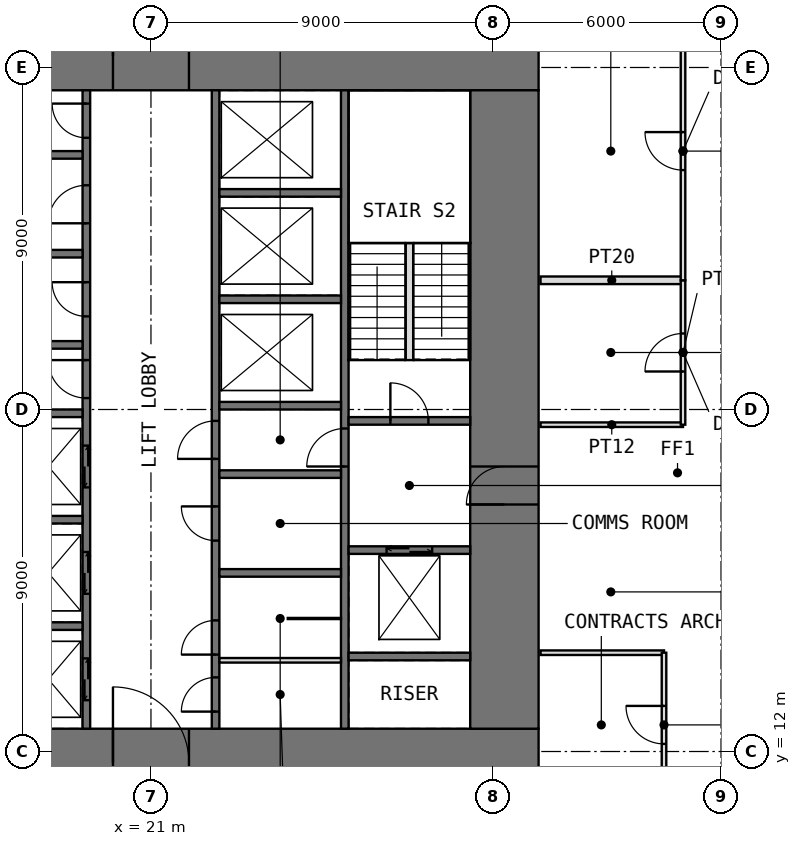
"""IFC4 building model, lengths in metres.
Left out: names, types, materials, properties, quantities, classifications, styles, units other than length and angle.
Written with IfcOpenShell. Run it as: python <this file> out.ifc"""

import sys

from ifc_helpers import new_model, si_unit, direction, frame, frame_2d, origin, place, context, subcontext, project, spatial, rectangle, extrude, element, fill, save


model = new_model("IFC4")
c1 = context("Model", 3, precision=1e-05, world=origin(), true_north=direction((0.0, 1.0)))
c2 = subcontext(c1, "Body", "Model", "MODEL_VIEW")
j1 = project(units=[si_unit("LENGTHUNIT", "METRE"), si_unit("PLANEANGLEUNIT", "RADIAN")], contexts=[c1])
p1 = place(None, origin())
s1 = spatial("IfcSite", under=j1, at=p1, CompositionType="ELEMENT")
p2 = place(p1, origin())
s2 = spatial("IfcBuilding", under=s1, at=p2, CompositionType="ELEMENT")
p3 = place(p2, frame((0.0, 0.0, 74.5)))
s3 = spatial("IfcBuildingStorey", under=s2, at=p3, CompositionType="ELEMENT", Elevation=74.5)
p4 = place(p3, frame((10.8, 11.7, -0.05), z_axis=(0.0, 0.0, 1.0), x_axis=(1.0, 0.0, 0.0)))
e1 = element("IfcWall", 1, at=p4, inside=s3, PredefinedType="SHEAR", context=c2, shape_type="SweptSolid", body=[
    extrude(rectangle(XDim=20.4, YDim=1.8, at=frame_2d((10.2, 0.0))), origin(), (0.0, 0.0, 1.0), 4.0),
])
p5 = place(p4, frame((9.2, 0.0, 0.05)))
e2 = element("IfcOpeningElement", 2, at=p5, cuts=e1, PredefinedType="OPENING", context=c2, shape_type="SweptSolid", body=[
    extrude(rectangle(XDim=2.0, YDim=2.2, at=frame_2d((1.0, 1.1))), frame((0.0, 0.91, 0.0), z_axis=(0.0, -1.0, 0.0), x_axis=(1.0, 0.0, 0.0)), (0.0, 0.0, 1.0), 1.82),
])
p6 = place(p3, frame((10.8, 30.3, -0.05), z_axis=(0.0, 0.0, 1.0), x_axis=(1.0, 0.0, 0.0)))
e3 = element("IfcWall", 3, at=p6, inside=s3, PredefinedType="SHEAR", context=c2, shape_type="SweptSolid", body=[
    extrude(rectangle(XDim=20.4, YDim=1.8, at=frame_2d((10.2, 0.0))), origin(), (0.0, 0.0, 1.0), 4.0),
])
p7 = place(p6, frame((9.2, 0.0, 0.05)))
e4 = element("IfcOpeningElement", 4, at=p7, cuts=e3, PredefinedType="OPENING", context=c2, shape_type="SweptSolid", body=[
    extrude(rectangle(XDim=2.0, YDim=2.2, at=frame_2d((1.0, 1.1))), frame((0.0, 0.91, 0.0), z_axis=(0.0, -1.0, 0.0), x_axis=(1.0, 0.0, 0.0)), (0.0, 0.0, 1.0), 1.82),
])
p8 = place(p3, frame((30.3, 12.6, -0.05), z_axis=(0.0, 0.0, 1.0), x_axis=(0.0, 1.0, 0.0)))
e5 = element("IfcWall", 5, at=p8, inside=s3, PredefinedType="SHEAR", context=c2, shape_type="SweptSolid", body=[
    extrude(rectangle(XDim=16.8, YDim=1.8, at=frame_2d((8.4, 0.0))), origin(), (0.0, 0.0, 1.0), 4.0),
])
p9 = place(p8, frame((5.9, 0.0, 0.05)))
e6 = element("IfcOpeningElement", 6, at=p9, cuts=e5, PredefinedType="OPENING", context=c2, shape_type="SweptSolid", body=[
    extrude(rectangle(XDim=1.0, YDim=2.2, at=frame_2d((0.5, 1.1))), frame((0.0, 0.91, 0.0), z_axis=(0.0, -1.0, 0.0), x_axis=(1.0, 0.0, 0.0)), (0.0, 0.0, 1.0), 1.82),
])
p10 = place(p3, frame((19.3, 12.6, -0.05), z_axis=(0.0, 0.0, 1.0), x_axis=(0.0, 1.0, 0.0)))
e7 = element("IfcWall", 7, at=p10, inside=s3, PredefinedType="SHEAR", context=c2, shape_type="SweptSolid", body=[
    extrude(rectangle(XDim=16.8, YDim=0.2, at=frame_2d((8.4, 0.0))), origin(), (0.0, 0.0, 1.0), 4.0),
])
p11 = place(p10, frame((8.7, 0.0, 0.05)))
e8 = element("IfcOpeningElement", 8, at=p11, cuts=e7, PredefinedType="OPENING", context=c2, shape_type="SweptSolid", body=[
    extrude(rectangle(XDim=1.0, YDim=2.2, at=frame_2d((0.5, 1.1))), frame((0.0, 0.11, 0.0), z_axis=(0.0, -1.0, 0.0), x_axis=(1.0, 0.0, 0.0)), (0.0, 0.0, 1.0), 0.22),
])
p12 = place(p10, frame((10.85, 0.0, 0.05)))
e9 = element("IfcOpeningElement", 9, at=p12, cuts=e7, PredefinedType="OPENING", context=c2, shape_type="SweptSolid", body=[
    extrude(rectangle(XDim=0.9, YDim=2.2, at=frame_2d((0.45, 1.1))), frame((0.0, 0.11, 0.0), z_axis=(0.0, -1.0, 0.0), x_axis=(1.0, 0.0, 0.0)), (0.0, 0.0, 1.0), 0.22),
])
p13 = place(p10, frame((13.3, 0.0, 0.05)))
e10 = element("IfcOpeningElement", 10, at=p13, cuts=e7, PredefinedType="OPENING", context=c2, shape_type="SweptSolid", body=[
    extrude(rectangle(XDim=1.0, YDim=2.2, at=frame_2d((0.5, 1.1))), frame((0.0, 0.11, 0.0), z_axis=(0.0, -1.0, 0.0), x_axis=(1.0, 0.0, 0.0)), (0.0, 0.0, 1.0), 0.22),
])
p14 = place(p10, frame((15.55, 0.0, 0.05)))
e11 = element("IfcOpeningElement", 11, at=p14, cuts=e7, PredefinedType="OPENING", context=c2, shape_type="SweptSolid", body=[
    extrude(rectangle(XDim=0.9, YDim=2.2, at=frame_2d((0.45, 1.1))), frame((0.0, 0.11, 0.0), z_axis=(0.0, -1.0, 0.0), x_axis=(1.0, 0.0, 0.0)), (0.0, 0.0, 1.0), 0.22),
])
p15 = place(p10, frame((0.75, 0.0, 0.05)))
e12 = element("IfcOpeningElement", 12, at=p15, cuts=e7, PredefinedType="OPENING", context=c2, shape_type="SweptSolid", body=[
    extrude(rectangle(XDim=1.1, YDim=2.2, at=frame_2d((0.55, 1.1))), frame((0.0, 0.11, 0.0), z_axis=(0.0, -1.0, 0.0), x_axis=(1.0, 0.0, 0.0)), (0.0, 0.0, 1.0), 0.22),
])
p16 = place(p10, frame((3.55, 0.0, 0.05)))
e13 = element("IfcOpeningElement", 13, at=p16, cuts=e7, PredefinedType="OPENING", context=c2, shape_type="SweptSolid", body=[
    extrude(rectangle(XDim=1.1, YDim=2.2, at=frame_2d((0.55, 1.1))), frame((0.0, 0.11, 0.0), z_axis=(0.0, -1.0, 0.0), x_axis=(1.0, 0.0, 0.0)), (0.0, 0.0, 1.0), 0.22),
])
p17 = place(p10, frame((6.35, 0.0, 0.05)))
e14 = element("IfcOpeningElement", 14, at=p17, cuts=e7, PredefinedType="OPENING", context=c2, shape_type="SweptSolid", body=[
    extrude(rectangle(XDim=1.1, YDim=2.2, at=frame_2d((0.55, 1.1))), frame((0.0, 0.11, 0.0), z_axis=(0.0, -1.0, 0.0), x_axis=(1.0, 0.0, 0.0)), (0.0, 0.0, 1.0), 0.22),
])
p18 = place(p3, frame((22.7, 12.6, -0.05), z_axis=(0.0, 0.0, 1.0), x_axis=(0.0, 1.0, 0.0)))
e15 = element("IfcWall", 15, at=p18, inside=s3, PredefinedType="SHEAR", context=c2, shape_type="SweptSolid", body=[
    extrude(rectangle(XDim=16.8, YDim=0.2, at=frame_2d((8.4, 0.0))), origin(), (0.0, 0.0, 1.0), 4.0),
])
p19 = place(p18, frame((0.45, 0.0, 0.05)))
e16 = element("IfcOpeningElement", 16, at=p19, cuts=e15, PredefinedType="OPENING", context=c2, shape_type="SweptSolid", body=[
    extrude(rectangle(XDim=0.9, YDim=2.2, at=frame_2d((0.45, 1.1))), frame((0.0, 0.11, 0.0), z_axis=(0.0, -1.0, 0.0), x_axis=(1.0, 0.0, 0.0)), (0.0, 0.0, 1.0), 0.22),
])
p20 = place(p18, frame((7.1, 0.0, 0.05)))
e17 = element("IfcOpeningElement", 17, at=p20, cuts=e15, PredefinedType="OPENING", context=c2, shape_type="SweptSolid", body=[
    extrude(rectangle(XDim=1.0, YDim=2.2, at=frame_2d((0.5, 1.1))), frame((0.0, 0.11, 0.0), z_axis=(0.0, -1.0, 0.0), x_axis=(1.0, 0.0, 0.0)), (0.0, 0.0, 1.0), 0.22),
])
p21 = place(p18, frame((1.95, 0.0, 0.05)))
e18 = element("IfcOpeningElement", 18, at=p21, cuts=e15, PredefinedType="OPENING", context=c2, shape_type="SweptSolid", body=[
    extrude(rectangle(XDim=0.9, YDim=2.2, at=frame_2d((0.45, 1.1))), frame((0.0, 0.11, 0.0), z_axis=(0.0, -1.0, 0.0), x_axis=(1.0, 0.0, 0.0)), (0.0, 0.0, 1.0), 0.22),
])
p22 = place(p18, frame((4.95, 0.0, 0.05)))
e19 = element("IfcOpeningElement", 19, at=p22, cuts=e15, PredefinedType="OPENING", context=c2, shape_type="SweptSolid", body=[
    extrude(rectangle(XDim=0.9, YDim=2.2, at=frame_2d((0.45, 1.1))), frame((0.0, 0.11, 0.0), z_axis=(0.0, -1.0, 0.0), x_axis=(1.0, 0.0, 0.0)), (0.0, 0.0, 1.0), 0.22),
])
p23 = place(p3, frame((26.1, 12.6, -0.05), z_axis=(0.0, 0.0, 1.0), x_axis=(0.0, 1.0, 0.0)))
e20 = element("IfcWall", 20, at=p23, inside=s3, PredefinedType="SHEAR", context=c2, shape_type="SweptSolid", body=[
    extrude(rectangle(XDim=16.8, YDim=0.2, at=frame_2d((8.4, 0.0))), origin(), (0.0, 0.0, 1.0), 4.0),
])
p24 = place(p23, frame((6.9, 0.0, 0.05)))
e21 = element("IfcOpeningElement", 21, at=p24, cuts=e20, PredefinedType="OPENING", context=c2, shape_type="SweptSolid", body=[
    extrude(rectangle(XDim=1.0, YDim=2.2, at=frame_2d((0.5, 1.1))), frame((0.0, 0.11, 0.0), z_axis=(0.0, -1.0, 0.0), x_axis=(1.0, 0.0, 0.0)), (0.0, 0.0, 1.0), 0.22),
])
for number, where, z_axis, x_axis in (
    (22, (16.0, 15.3, -0.05), (0.0, 0.0, 1.0), (1.0, 0.0, 0.0)),
    (23, (16.0, 18.1, -0.05), (0.0, 0.0, 1.0), (1.0, 0.0, 0.0)),
    (24, (16.0, 20.9, -0.05), (0.0, 0.0, 1.0), (1.0, 0.0, 0.0)),
    (25, (16.0, 22.7, -0.05), (0.0, 0.0, 1.0), (1.0, 0.0, 0.0)),
    (26, (16.0, 25.1, -0.05), (0.0, 0.0, 1.0), (1.0, 0.0, 0.0)),
    (27, (16.0, 27.7, -0.05), (0.0, 0.0, 1.0), (1.0, 0.0, 0.0)),
    (28, (22.8, 16.7, -0.05), (0.0, 0.0, 1.0), (1.0, 0.0, 0.0)),
    (29, (22.8, 19.3, -0.05), (0.0, 0.0, 1.0), (1.0, 0.0, 0.0)),
    (30, (22.8, 21.1, -0.05), (0.0, 0.0, 1.0), (1.0, 0.0, 0.0)),
    (31, (22.8, 23.9, -0.05), (0.0, 0.0, 1.0), (1.0, 0.0, 0.0)),
    (32, (22.8, 26.7, -0.05), (0.0, 0.0, 1.0), (1.0, 0.0, 0.0)),
    (33, (26.2, 14.5, -0.05), (0.0, 0.0, 1.0), (1.0, 0.0, 0.0)),
):
    element("IfcWall", number, at=place(p3, frame(where, z_axis=z_axis, x_axis=x_axis)), inside=s3, PredefinedType="SHEAR", context=c2, shape_type="SweptSolid", body=[
        extrude(rectangle(XDim=3.2, YDim=0.2, at=frame_2d((1.6, 0.0))), origin(), (0.0, 0.0, 1.0), 4.0),
    ])
p25 = place(p3, frame((26.2, 17.3, -0.05), z_axis=(0.0, 0.0, 1.0), x_axis=(1.0, 0.0, 0.0)))
e34 = element("IfcWall", 34, at=p25, inside=s3, PredefinedType="SHEAR", context=c2, shape_type="SweptSolid", body=[
    extrude(rectangle(XDim=3.2, YDim=0.2, at=frame_2d((1.6, 0.0))), origin(), (0.0, 0.0, 1.0), 4.0),
])
p26 = place(p25, frame((1.0, 0.0, 0.05)))
e35 = element("IfcOpeningElement", 35, at=p26, cuts=e34, PredefinedType="OPENING", context=c2, shape_type="SweptSolid", body=[
    extrude(rectangle(XDim=1.2, YDim=2.2, at=frame_2d((0.6, 1.1))), frame((0.0, 0.11, 0.0), z_axis=(0.0, -1.0, 0.0), x_axis=(1.0, 0.0, 0.0)), (0.0, 0.0, 1.0), 0.22),
])
p27 = place(p3, frame((26.2, 20.7, -0.05), z_axis=(0.0, 0.0, 1.0), x_axis=(1.0, 0.0, 0.0)))
e36 = element("IfcWall", 36, at=p27, inside=s3, PredefinedType="SHEAR", context=c2, shape_type="SweptSolid", body=[
    extrude(rectangle(XDim=3.2, YDim=0.2, at=frame_2d((1.6, 0.0))), origin(), (0.0, 0.0, 1.0), 4.0),
])
p28 = place(p27, frame((1.1, 0.0, 0.05)))
e37 = element("IfcOpeningElement", 37, at=p28, cuts=e36, PredefinedType="OPENING", context=c2, shape_type="SweptSolid", body=[
    extrude(rectangle(XDim=1.0, YDim=2.2, at=frame_2d((0.5, 1.1))), frame((0.0, 0.11, 0.0), z_axis=(0.0, -1.0, 0.0), x_axis=(1.0, 0.0, 0.0)), (0.0, 0.0, 1.0), 0.22),
])
p29 = place(p3, frame((22.8, 14.4, 0.0), z_axis=(0.0, 0.0, 1.0), x_axis=(1.0, 0.0, 0.0)))
e38 = element("IfcWall", 38, at=p29, inside=s3, PredefinedType="PARTITIONING", context=c2, shape_type="SweptSolid", body=[
    extrude(rectangle(XDim=3.2, YDim=0.12, at=frame_2d((1.6, 0.0))), origin(), (0.0, 0.0, 1.0), 3.75),
])
p30 = place(p3, frame((24.6, 15.5, 0.0), z_axis=(0.0, 0.0, 1.0), x_axis=(1.0, 0.0, 0.0)))
e39 = element("IfcWall", 39, at=p30, inside=s3, PredefinedType="PARTITIONING", context=c2, shape_type="SweptSolid", body=[
    extrude(rectangle(XDim=1.4, YDim=0.03, at=frame_2d((0.7, 0.0))), origin(), (0.0, 0.0, 1.0), 3.75),
])
p31 = place(p3, frame((31.25, 14.6, 0.0), z_axis=(0.0, 0.0, 1.0), x_axis=(1.0, 0.0, 0.0)))
e40 = element("IfcWall", 40, at=p31, inside=s3, PredefinedType="PARTITIONING", context=c2, shape_type="SweptSolid", body=[
    extrude(rectangle(XDim=3.25, YDim=0.12, at=frame_2d((1.625, 0.0))), origin(), (0.0, 0.0, 1.0), 3.75),
])
p32 = place(p3, frame((31.25, 20.6, 0.0), z_axis=(0.0, 0.0, 1.0), x_axis=(1.0, 0.0, 0.0)))
e41 = element("IfcWall", 41, at=p32, inside=s3, PredefinedType="PARTITIONING", context=c2, shape_type="SweptSolid", body=[
    extrude(rectangle(XDim=3.75, YDim=0.12, at=frame_2d((1.875, 0.0))), origin(), (0.0, 0.0, 1.0), 3.75),
])
p33 = place(p3, frame((31.25, 24.4, 0.0), z_axis=(0.0, 0.0, 1.0), x_axis=(1.0, 0.0, 0.0)))
e42 = element("IfcWall", 42, at=p33, inside=s3, PredefinedType="PARTITIONING", context=c2, shape_type="SweptSolid", body=[
    extrude(rectangle(XDim=3.75, YDim=0.2, at=frame_2d((1.875, 0.0))), origin(), (0.0, 0.0, 1.0), 3.75),
])
p34 = place(p3, frame((34.5, 10.8, 0.0), z_axis=(0.0, 0.0, 1.0), x_axis=(0.0, 1.0, 0.0)))
e43 = element("IfcWall", 43, at=p34, inside=s3, PredefinedType="PARTITIONING", context=c2, shape_type="SweptSolid", body=[
    extrude(rectangle(XDim=3.8, YDim=0.12, at=frame_2d((1.9, 0.0))), origin(), (0.0, 0.0, 1.0), 3.75),
])
p35 = place(p34, frame((1.4, 0.0, 0.0)))
e44 = element("IfcOpeningElement", 44, at=p35, cuts=e43, PredefinedType="OPENING", context=c2, shape_type="SweptSolid", body=[
    extrude(rectangle(XDim=1.0, YDim=2.2, at=frame_2d((0.5, 1.1))), frame((0.0, 0.07, 0.0), z_axis=(0.0, -1.0, 0.0), x_axis=(1.0, 0.0, 0.0)), (0.0, 0.0, 1.0), 0.14),
])
p36 = place(p3, frame((35.0, 20.6, 0.0), z_axis=(0.0, 0.0, 1.0), x_axis=(0.0, 1.0, 0.0)))
e45 = element("IfcWall", 45, at=p36, inside=s3, PredefinedType="PARTITIONING", context=c2, shape_type="SweptSolid", body=[
    extrude(rectangle(XDim=3.8, YDim=0.12, at=frame_2d((1.9, 0.0))), origin(), (0.0, 0.0, 1.0), 3.75),
])
p37 = place(p36, frame((1.4, 0.0, 0.0)))
e46 = element("IfcOpeningElement", 46, at=p37, cuts=e45, PredefinedType="OPENING", context=c2, shape_type="SweptSolid", body=[
    extrude(rectangle(XDim=1.0, YDim=2.4, at=frame_2d((0.5, 1.2))), frame((0.0, 0.07, 0.0), z_axis=(0.0, -1.0, 0.0), x_axis=(1.0, 0.0, 0.0)), (0.0, 0.0, 1.0), 0.14),
])
p38 = place(p3, frame((35.0, 24.4, 0.0), z_axis=(0.0, 0.0, 1.0), x_axis=(0.0, 1.0, 0.0)))
e47 = element("IfcWall", 47, at=p38, inside=s3, PredefinedType="PARTITIONING", context=c2, shape_type="SweptSolid", body=[
    extrude(rectangle(XDim=6.8, YDim=0.12, at=frame_2d((3.4, 0.0))), origin(), (0.0, 0.0, 1.0), 3.75),
])
p39 = place(p38, frame((2.9, 0.0, 0.0)))
e48 = element("IfcOpeningElement", 48, at=p39, cuts=e47, PredefinedType="OPENING", context=c2, shape_type="SweptSolid", body=[
    extrude(rectangle(XDim=1.0, YDim=2.4, at=frame_2d((0.5, 1.2))), frame((0.0, 0.07, 0.0), z_axis=(0.0, -1.0, 0.0), x_axis=(1.0, 0.0, 0.0)), (0.0, 0.0, 1.0), 0.14),
])
p40 = place(p3, frame((27.8, 22.3, 0.0), z_axis=(0.0, 0.0, 1.0), x_axis=(0.0, 1.0, 0.0)))
e49 = element("IfcWall", 49, at=p40, inside=s3, PredefinedType="PARTITIONING", context=c2, shape_type="SweptSolid", body=[
    extrude(rectangle(XDim=3.08, YDim=0.2, at=frame_2d((1.54, 0.0))), origin(), (0.0, 0.0, 1.0), 4.0),
])
p41 = place(p5, origin())
e50 = element("IfcDoor", 50, at=p41, inside=s3, OperationType="DOUBLE_DOOR_SINGLE_SWING", PredefinedType="DOOR", context=c2, shape_type="SweptSolid", body=[
    extrude(rectangle(XDim=2.0, YDim=2.2, at=frame_2d((1.0, 1.1))), frame((0.0, 0.025, 0.0), z_axis=(0.0, -1.0, 0.0), x_axis=(1.0, 0.0, 0.0)), (0.0, 0.0, 1.0), 0.05),
])
fill(e2, e50)
p42 = place(p7, origin())
e51 = element("IfcDoor", 51, at=p42, inside=s3, OperationType="DOUBLE_DOOR_SINGLE_SWING", PredefinedType="DOOR", context=c2, shape_type="SweptSolid", body=[
    extrude(rectangle(XDim=2.0, YDim=2.2, at=frame_2d((1.0, 1.1))), frame((0.0, 0.025, 0.0), z_axis=(0.0, -1.0, 0.0), x_axis=(1.0, 0.0, 0.0)), (0.0, 0.0, 1.0), 0.05),
])
fill(e4, e51)
p43 = place(p19, origin())
e52 = element("IfcDoor", 52, at=p43, inside=s3, OperationType="SINGLE_SWING_LEFT", PredefinedType="DOOR", context=c2, shape_type="SweptSolid", body=[
    extrude(rectangle(XDim=0.9, YDim=2.2, at=frame_2d((0.45, 1.1))), frame((0.0, 0.025, 0.0), z_axis=(0.0, -1.0, 0.0), x_axis=(1.0, 0.0, 0.0)), (0.0, 0.0, 1.0), 0.05),
])
fill(e16, e52)
p44 = place(p9, origin())
e53 = element("IfcDoor", 53, at=p44, inside=s3, OperationType="SINGLE_SWING_LEFT", PredefinedType="DOOR", context=c2, shape_type="SweptSolid", body=[
    extrude(rectangle(XDim=1.0, YDim=2.2, at=frame_2d((0.5, 1.1))), frame((0.0, 0.025, 0.0), z_axis=(0.0, -1.0, 0.0), x_axis=(1.0, 0.0, 0.0)), (0.0, 0.0, 1.0), 0.05),
])
fill(e6, e53)
p45 = place(p28, origin())
e54 = element("IfcDoor", 54, at=p45, inside=s3, OperationType="SINGLE_SWING_LEFT", PredefinedType="DOOR", context=c2, shape_type="SweptSolid", body=[
    extrude(rectangle(XDim=1.0, YDim=2.2, at=frame_2d((0.5, 1.1))), frame((0.0, 0.025, 0.0), z_axis=(0.0, -1.0, 0.0), x_axis=(1.0, 0.0, 0.0)), (0.0, 0.0, 1.0), 0.05),
])
fill(e37, e54)
p46 = place(p24, origin())
e55 = element("IfcDoor", 55, at=p46, inside=s3, OperationType="SINGLE_SWING_LEFT", PredefinedType="DOOR", context=c2, shape_type="SweptSolid", body=[
    extrude(rectangle(XDim=1.0, YDim=2.2, at=frame_2d((0.5, 1.1))), frame((0.0, 0.025, 0.0), z_axis=(0.0, -1.0, 0.0), x_axis=(1.0, 0.0, 0.0)), (0.0, 0.0, 1.0), 0.05),
])
fill(e21, e55)
p47 = place(p11, origin())
e56 = element("IfcDoor", 56, at=p47, inside=s3, OperationType="SINGLE_SWING_RIGHT", PredefinedType="DOOR", context=c2, shape_type="SweptSolid", body=[
    extrude(rectangle(XDim=1.0, YDim=2.2, at=frame_2d((0.5, 1.1))), frame((0.0, 0.025, 0.0), z_axis=(0.0, -1.0, 0.0), x_axis=(1.0, 0.0, 0.0)), (0.0, 0.0, 1.0), 0.05),
])
fill(e8, e56)
p48 = place(p20, origin())
e57 = element("IfcDoor", 57, at=p48, inside=s3, OperationType="SINGLE_SWING_LEFT", PredefinedType="DOOR", context=c2, shape_type="SweptSolid", body=[
    extrude(rectangle(XDim=1.0, YDim=2.2, at=frame_2d((0.5, 1.1))), frame((0.0, 0.025, 0.0), z_axis=(0.0, -1.0, 0.0), x_axis=(1.0, 0.0, 0.0)), (0.0, 0.0, 1.0), 0.05),
])
fill(e17, e57)
p49 = place(p12, origin())
e58 = element("IfcDoor", 58, at=p49, inside=s3, OperationType="SINGLE_SWING_RIGHT", PredefinedType="DOOR", context=c2, shape_type="SweptSolid", body=[
    extrude(rectangle(XDim=0.9, YDim=2.2, at=frame_2d((0.45, 1.1))), frame((0.0, 0.025, 0.0), z_axis=(0.0, -1.0, 0.0), x_axis=(1.0, 0.0, 0.0)), (0.0, 0.0, 1.0), 0.05),
])
fill(e9, e58)
p50 = place(p13, origin())
e59 = element("IfcDoor", 59, at=p50, inside=s3, OperationType="SINGLE_SWING_LEFT", PredefinedType="DOOR", context=c2, shape_type="SweptSolid", body=[
    extrude(rectangle(XDim=1.0, YDim=2.2, at=frame_2d((0.5, 1.1))), frame((0.0, 0.025, 0.0), z_axis=(0.0, -1.0, 0.0), x_axis=(1.0, 0.0, 0.0)), (0.0, 0.0, 1.0), 0.05),
])
fill(e10, e59)
p51 = place(p14, origin())
e60 = element("IfcDoor", 60, at=p51, inside=s3, OperationType="SINGLE_SWING_RIGHT", PredefinedType="DOOR", context=c2, shape_type="SweptSolid", body=[
    extrude(rectangle(XDim=0.9, YDim=2.2, at=frame_2d((0.45, 1.1))), frame((0.0, 0.025, 0.0), z_axis=(0.0, -1.0, 0.0), x_axis=(1.0, 0.0, 0.0)), (0.0, 0.0, 1.0), 0.05),
])
fill(e11, e60)
p52 = place(p21, origin())
e61 = element("IfcDoor", 61, at=p52, inside=s3, OperationType="SINGLE_SWING_LEFT", PredefinedType="DOOR", context=c2, shape_type="SweptSolid", body=[
    extrude(rectangle(XDim=0.9, YDim=2.2, at=frame_2d((0.45, 1.1))), frame((0.0, 0.025, 0.0), z_axis=(0.0, -1.0, 0.0), x_axis=(1.0, 0.0, 0.0)), (0.0, 0.0, 1.0), 0.05),
])
fill(e18, e61)
p53 = place(p22, origin())
e62 = element("IfcDoor", 62, at=p53, inside=s3, OperationType="SINGLE_SWING_RIGHT", PredefinedType="DOOR", context=c2, shape_type="SweptSolid", body=[
    extrude(rectangle(XDim=0.9, YDim=2.2, at=frame_2d((0.45, 1.1))), frame((0.0, 0.025, 0.0), z_axis=(0.0, -1.0, 0.0), x_axis=(1.0, 0.0, 0.0)), (0.0, 0.0, 1.0), 0.05),
])
fill(e19, e62)
p54 = place(p35, origin())
e63 = element("IfcDoor", 63, at=p54, inside=s3, OperationType="SINGLE_SWING_RIGHT", PredefinedType="DOOR", context=c2, shape_type="SweptSolid", body=[
    extrude(rectangle(XDim=1.0, YDim=2.2, at=frame_2d((0.5, 1.1))), frame((0.0, 0.025, 0.0), z_axis=(0.0, -1.0, 0.0), x_axis=(1.0, 0.0, 0.0)), (0.0, 0.0, 1.0), 0.05),
])
fill(e44, e63)
p55 = place(p37, origin())
e64 = element("IfcDoor", 64, at=p55, inside=s3, OperationType="SINGLE_SWING_LEFT", PredefinedType="DOOR", context=c2, shape_type="SweptSolid", body=[
    extrude(rectangle(XDim=1.0, YDim=2.4, at=frame_2d((0.5, 1.2))), frame((0.0, 0.025, 0.0), z_axis=(0.0, -1.0, 0.0), x_axis=(1.0, 0.0, 0.0)), (0.0, 0.0, 1.0), 0.05),
])
fill(e46, e64)
p56 = place(p39, origin())
e65 = element("IfcDoor", 65, at=p56, inside=s3, OperationType="SINGLE_SWING_RIGHT", PredefinedType="DOOR", context=c2, shape_type="SweptSolid", body=[
    extrude(rectangle(XDim=1.0, YDim=2.4, at=frame_2d((0.5, 1.2))), frame((0.0, 0.025, 0.0), z_axis=(0.0, -1.0, 0.0), x_axis=(1.0, 0.0, 0.0)), (0.0, 0.0, 1.0), 0.05),
])
fill(e48, e65)
p57 = place(p15, origin())
e66 = element("IfcDoor", 66, at=p57, inside=s3, OperationType="DOUBLE_DOOR_SLIDING", PredefinedType="DOOR", context=c2, shape_type="SweptSolid", body=[
    extrude(rectangle(XDim=1.1, YDim=2.2, at=frame_2d((0.55, 1.1))), frame((0.0, 0.025, 0.0), z_axis=(0.0, -1.0, 0.0), x_axis=(1.0, 0.0, 0.0)), (0.0, 0.0, 1.0), 0.05),
])
fill(e12, e66)
p58 = place(p16, origin())
e67 = element("IfcDoor", 67, at=p58, inside=s3, OperationType="DOUBLE_DOOR_SLIDING", PredefinedType="DOOR", context=c2, shape_type="SweptSolid", body=[
    extrude(rectangle(XDim=1.1, YDim=2.2, at=frame_2d((0.55, 1.1))), frame((0.0, 0.025, 0.0), z_axis=(0.0, -1.0, 0.0), x_axis=(1.0, 0.0, 0.0)), (0.0, 0.0, 1.0), 0.05),
])
fill(e13, e67)
p59 = place(p17, origin())
e68 = element("IfcDoor", 68, at=p59, inside=s3, OperationType="DOUBLE_DOOR_SLIDING", PredefinedType="DOOR", context=c2, shape_type="SweptSolid", body=[
    extrude(rectangle(XDim=1.1, YDim=2.2, at=frame_2d((0.55, 1.1))), frame((0.0, 0.025, 0.0), z_axis=(0.0, -1.0, 0.0), x_axis=(1.0, 0.0, 0.0)), (0.0, 0.0, 1.0), 0.05),
])
fill(e14, e68)
p60 = place(p26, origin())
e69 = element("IfcDoor", 69, at=p60, inside=s3, OperationType="DOUBLE_DOOR_SLIDING", PredefinedType="DOOR", context=c2, shape_type="SweptSolid", body=[
    extrude(rectangle(XDim=1.2, YDim=2.2, at=frame_2d((0.6, 1.1))), frame((0.0, 0.025, 0.0), z_axis=(0.0, -1.0, 0.0), x_axis=(1.0, 0.0, 0.0)), (0.0, 0.0, 1.0), 0.05),
])
fill(e35, e69)
save(model, sys.argv[1])
